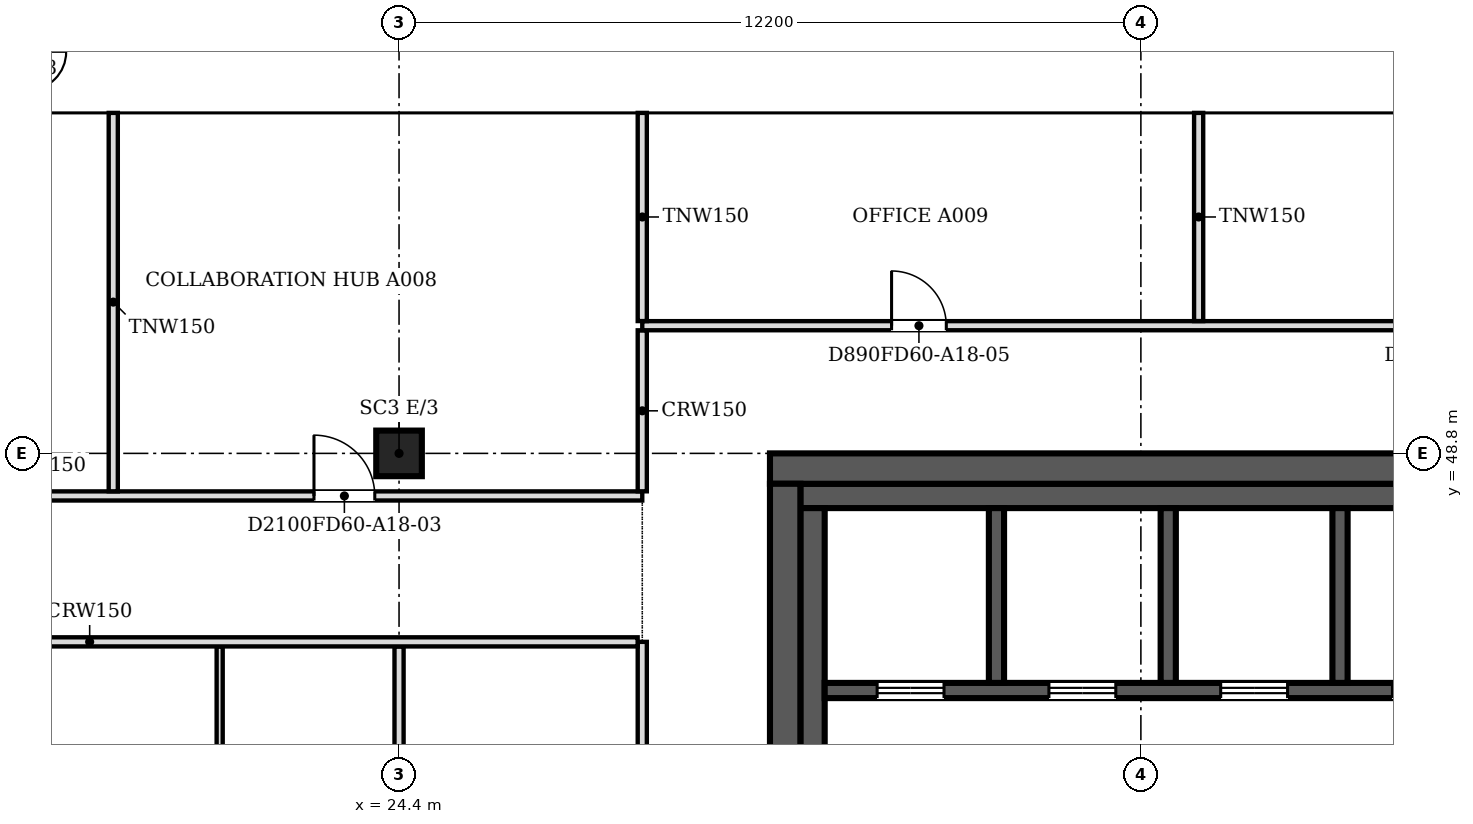
"""IFC4 building model, lengths in metres.
Left out: names, types, materials, properties, quantities, classifications, styles, units other than length and angle.
Written with IfcOpenShell. Run it as: python <this file> out.ifc"""

import sys

from ifc_helpers import new_model, si_unit, direction, frame, frame_2d, origin, origin_2d, place, context, subcontext, project, spatial, polyline, rectangle, outline, extrude, faceted_brep, source, transform, mapped, element, fill, save


model = new_model("IFC4")
c1 = context("Model", 3, precision=1e-05, world=origin(), true_north=direction((0.0, 1.0)))
c2 = subcontext(c1, "Body", "Model", "MODEL_VIEW")
j1 = project(units=[si_unit("LENGTHUNIT", "METRE"), si_unit("PLANEANGLEUNIT", "RADIAN")], contexts=[c1])
p1 = place(None, origin())
s1 = spatial("IfcSite", under=j1, at=p1, CompositionType="ELEMENT")
p2 = place(p1, origin())
s2 = spatial("IfcBuilding", under=s1, at=p2, CompositionType="ELEMENT")
p3 = place(p2, frame((0.0, 0.0, 197.9)))
s3 = spatial("IfcBuildingStorey", under=s2, at=p3, CompositionType="ELEMENT", Elevation=197.9)
p4 = place(p3, frame((24.4, 48.8, 0.0), z_axis=(0.0, 0.0, 1.0), x_axis=(1.0, 0.0, 0.0)))
e1 = element("IfcColumn", 1, at=p4, inside=s3, PredefinedType="COLUMN", context=c2, shape_type="SweptSolid", body=[
    extrude(rectangle(XDim=0.75, YDim=0.75, at=origin_2d()), origin(), (0.0, 0.0, 1.0), 3.6),
])
m1 = source(origin(), c2, "Body", "SweptSolid", [
    extrude(outline(polyline([(6.1, 0.0), (3.05, 3.8), (0.0, 0.0), (6.1, 0.0)])), frame((0.0, 0.25, 0.0), z_axis=(0.0, -1.0, 0.0), x_axis=(1.0, 0.0, 0.0)), (0.0, 0.0, 1.0), 0.5),
])
p5 = place(p3, frame((45.75, 54.65, 0.0), z_axis=(0.0, 0.0, 1.0), x_axis=(-1.0, 0.0, 0.0)))
e2 = element("IfcWall", 2, at=p5, inside=s3, PredefinedType="SOLIDWALL", context=c2, shape_type="MappedRepresentation", body=[
    mapped(m1, transform((0.0, 0.0, 0.0), scale=1.0)),
])
m2 = source(origin(), c2, "Body", "SweptSolid", [
    extrude(outline(polyline([(5.579, 0.25), (3.05, 3.401), (0.521, 0.25), (5.579, 0.25)])), frame((0.0, 0.26, 0.0), z_axis=(0.0, -1.0, 0.0), x_axis=(1.0, 0.0, 0.0)), (0.0, 0.0, 1.0), 0.52),
])
p6 = place(p5, origin())
e3 = element("IfcOpeningElement", 3, at=p6, cuts=e2, PredefinedType="OPENING", context=c2, shape_type="MappedRepresentation", body=[
    mapped(m2, transform((0.0, 0.0, 0.0), scale=1.0)),
])
m3 = source(origin(), c2, "Body", "Brep", [
    faceted_brep([(6.1, -0.25, 0.0), (3.05, -0.25, 3.8), (0.0, -0.25, 0.0), (6.1, -0.25, 0.0), (0.0, 0.25, 0.0), (3.05, 0.25, 3.8), (6.1, 0.25, 0.0), (6.1, 0.25, 0.0)], [[[0, 1, 2, 3]], [[4, 5, 6, 7]], [[6, 5, 1, 0]], [[5, 4, 2, 1]], [[4, 7, 3, 2]], [[3, 7, 6, 0]]]),
])
p7 = place(p3, frame((39.65, 54.65, 0.0), z_axis=(0.0, 0.0, 1.0), x_axis=(-1.0, 0.0, 0.0)))
e4 = element("IfcWall", 4, at=p7, inside=s3, PredefinedType="SOLIDWALL", context=c2, shape_type="MappedRepresentation", body=[
    mapped(m3, transform((0.0, 0.0, 0.0), scale=1.0)),
])
p8 = place(p7, origin())
e5 = element("IfcOpeningElement", 5, at=p8, cuts=e4, PredefinedType="OPENING", context=c2, shape_type="MappedRepresentation", body=[
    mapped(m2, transform((0.0, 0.0, 0.0), scale=1.0)),
])
p9 = place(p3, frame((33.55, 54.65, 0.0), z_axis=(0.0, 0.0, 1.0), x_axis=(-1.0, 0.0, 0.0)))
e6 = element("IfcWall", 6, at=p9, inside=s3, PredefinedType="SOLIDWALL", context=c2, shape_type="MappedRepresentation", body=[
    mapped(m1, transform((0.0, 0.0, 0.0), scale=1.0)),
])
p10 = place(p9, origin())
e7 = element("IfcOpeningElement", 7, at=p10, cuts=e6, PredefinedType="OPENING", context=c2, shape_type="MappedRepresentation", body=[
    mapped(m2, transform((0.0, 0.0, 0.0), scale=1.0)),
])
p11 = place(p3, frame((27.45, 54.65, 0.0), z_axis=(0.0, 0.0, 1.0), x_axis=(-1.0, 0.0, 0.0)))
e8 = element("IfcWall", 8, at=p11, inside=s3, PredefinedType="SOLIDWALL", context=c2, shape_type="MappedRepresentation", body=[
    mapped(m3, transform((0.0, 0.0, 0.0), scale=1.0)),
])
p12 = place(p11, origin())
e9 = element("IfcOpeningElement", 9, at=p12, cuts=e8, PredefinedType="OPENING", context=c2, shape_type="MappedRepresentation", body=[
    mapped(m2, transform((0.0, 0.0, 0.0), scale=1.0)),
])
p13 = place(p3, frame((21.35, 54.65, 0.0), z_axis=(0.0, 0.0, 1.0), x_axis=(-1.0, 0.0, 0.0)))
e10 = element("IfcWall", 10, at=p13, inside=s3, PredefinedType="SOLIDWALL", context=c2, shape_type="MappedRepresentation", body=[
    mapped(m1, transform((0.0, 0.0, 0.0), scale=1.0)),
])
p14 = place(p13, origin())
e11 = element("IfcOpeningElement", 11, at=p14, cuts=e10, PredefinedType="OPENING", context=c2, shape_type="MappedRepresentation", body=[
    mapped(m2, transform((0.0, 0.0, 0.0), scale=1.0)),
])
p15 = place(p2, frame((0.0, 0.0, 201.7)))
s4 = spatial("IfcBuildingStorey", under=s2, at=p15, CompositionType="ELEMENT", Elevation=201.7)
m4 = source(origin(), c2, "Body", "Brep", [
    faceted_brep([(3.05, -0.25, 0.0), (6.1, -0.25, 3.8), (6.1, -0.25, 3.8), (3.05, -0.25, 7.6), (0.0, -0.25, 3.8), (0.0, 0.25, 3.8), (3.05, 0.25, 7.6), (6.1, 0.25, 3.8), (6.1, 0.25, 3.8), (3.05, 0.25, 0.0)], [[[0, 1, 2, 3, 4]], [[5, 6, 7, 8, 9]], [[9, 8, 1, 0]], [[7, 6, 3, 2]], [[6, 5, 4, 3]], [[5, 9, 0, 4]], [[1, 8, 7, 2]]]),
])
p16 = place(p15, frame((42.7, 54.65, -3.8), z_axis=(0.0, 0.0, 1.0), x_axis=(-1.0, 0.0, 0.0)))
e12 = element("IfcWall", 12, at=p16, inside=s4, PredefinedType="SOLIDWALL", context=c2, shape_type="MappedRepresentation", body=[
    mapped(m4, transform((0.0, 0.0, 0.0), scale=1.0)),
])
m5 = source(origin(), c2, "Body", "SweptSolid", [
    extrude(outline(polyline([(3.05, 0.399), (5.78, 3.8), (3.05, 7.201), (0.321, 3.8), (3.05, 0.399)])), frame((0.0, 0.26, 0.0), z_axis=(0.0, -1.0, 0.0), x_axis=(1.0, 0.0, 0.0)), (0.0, 0.0, 1.0), 0.52),
])
p17 = place(p16, origin())
e13 = element("IfcOpeningElement", 13, at=p17, cuts=e12, PredefinedType="OPENING", context=c2, shape_type="MappedRepresentation", body=[
    mapped(m5, transform((0.0, 0.0, 0.0), scale=1.0)),
])
m6 = source(origin(), c2, "Body", "SweptSolid", [
    extrude(outline(polyline([(3.05, 0.0), (6.1, 3.8), (3.05, 7.6), (0.0, 3.8), (3.05, 0.0)])), frame((0.0, 0.25, 0.0), z_axis=(0.0, -1.0, 0.0), x_axis=(1.0, 0.0, 0.0)), (0.0, 0.0, 1.0), 0.5),
])
p18 = place(p15, frame((36.6, 54.65, -3.8), z_axis=(0.0, 0.0, 1.0), x_axis=(-1.0, 0.0, 0.0)))
e14 = element("IfcWall", 14, at=p18, inside=s4, PredefinedType="SOLIDWALL", context=c2, shape_type="MappedRepresentation", body=[
    mapped(m6, transform((0.0, 0.0, 0.0), scale=1.0)),
])
p19 = place(p18, origin())
e15 = element("IfcOpeningElement", 15, at=p19, cuts=e14, PredefinedType="OPENING", context=c2, shape_type="MappedRepresentation", body=[
    mapped(m5, transform((0.0, 0.0, 0.0), scale=1.0)),
])
p20 = place(p15, frame((30.5, 54.65, -3.8), z_axis=(0.0, 0.0, 1.0), x_axis=(-1.0, 0.0, 0.0)))
e16 = element("IfcWall", 16, at=p20, inside=s4, PredefinedType="SOLIDWALL", context=c2, shape_type="MappedRepresentation", body=[
    mapped(m6, transform((0.0, 0.0, 0.0), scale=1.0)),
])
p21 = place(p20, origin())
e17 = element("IfcOpeningElement", 17, at=p21, cuts=e16, PredefinedType="OPENING", context=c2, shape_type="MappedRepresentation", body=[
    mapped(m5, transform((0.0, 0.0, 0.0), scale=1.0)),
])
p22 = place(p15, frame((24.4, 54.65, -3.8), z_axis=(0.0, 0.0, 1.0), x_axis=(-1.0, 0.0, 0.0)))
e18 = element("IfcWall", 18, at=p22, inside=s4, PredefinedType="SOLIDWALL", context=c2, shape_type="MappedRepresentation", body=[
    mapped(m4, transform((0.0, 0.0, 0.0), scale=1.0)),
])
p23 = place(p22, origin())
e19 = element("IfcOpeningElement", 19, at=p23, cuts=e18, PredefinedType="OPENING", context=c2, shape_type="MappedRepresentation", body=[
    mapped(m5, transform((0.0, 0.0, 0.0), scale=1.0)),
])
p24 = place(p3, frame((30.75, 24.9, 0.0), z_axis=(0.0, 0.0, 1.0), x_axis=(0.0, 1.0, 0.0)))
e20 = element("IfcWall", 20, at=p24, inside=s3, PredefinedType="SHEAR", context=c2, shape_type="SweptSolid", body=[
    extrude(rectangle(XDim=23.4, YDim=0.5, at=frame_2d((11.7, 0.0))), origin(), (0.0, 0.0, 1.0), 3.8),
])
m7 = source(origin(), c2, "Body", "SweptSolid", [
    extrude(rectangle(XDim=2.1, YDim=2.4, at=frame_2d((1.05, 1.2))), frame((0.0, 0.26, 0.0), z_axis=(0.0, -1.0, 0.0), x_axis=(1.0, 0.0, 0.0)), (0.0, 0.0, 1.0), 0.52),
])
p25 = place(p24, frame((4.9, 0.0, 0.0)))
e21 = element("IfcOpeningElement", 21, at=p25, cuts=e20, PredefinedType="OPENING", context=c2, shape_type="MappedRepresentation", body=[
    mapped(m7, transform((0.0, 0.0, 0.0), scale=1.0)),
])
p26 = place(p24, frame((16.4, 0.0, 0.0)))
e22 = element("IfcOpeningElement", 22, at=p26, cuts=e20, PredefinedType="OPENING", context=c2, shape_type="MappedRepresentation", body=[
    mapped(m7, transform((0.0, 0.0, 0.0), scale=1.0)),
])
p27 = place(p3, frame((30.5, 48.55, 0.0), z_axis=(0.0, 0.0, 1.0), x_axis=(1.0, 0.0, 0.0)))
e23 = element("IfcWall", 23, at=p27, inside=s3, PredefinedType="SHEAR", context=c2, shape_type="SweptSolid", body=[
    extrude(rectangle(XDim=24.4, YDim=0.5, at=frame_2d((12.2, 0.0))), origin(), (0.0, 0.0, 1.0), 3.8),
])
p28 = place(p3, frame((31.0, 48.1, 0.0), z_axis=(0.0, 0.0, 1.0), x_axis=(1.0, 0.0, 0.0)))
e24 = element("IfcWall", 24, at=p28, inside=s3, PredefinedType="SOLIDWALL", context=c2, shape_type="SweptSolid", body=[
    extrude(rectangle(XDim=23.4, YDim=0.4, at=frame_2d((11.7, 0.0))), origin(), (0.0, 0.0, 1.0), 3.8),
])
p29 = place(p3, frame((31.2, 43.4, 0.0), z_axis=(0.0, 0.0, 1.0), x_axis=(0.0, 1.0, 0.0)))
e25 = element("IfcWall", 25, at=p29, inside=s3, PredefinedType="SOLIDWALL", context=c2, shape_type="SweptSolid", body=[
    extrude(rectangle(XDim=4.5, YDim=0.4, at=frame_2d((2.25, 0.0))), origin(), (0.0, 0.0, 1.0), 3.8),
])
p30 = place(p3, frame((42.45, 44.9, 0.0), z_axis=(0.0, 0.0, 1.0), x_axis=(-1.0, 0.0, 0.0)))
e26 = element("IfcWall", 26, at=p30, inside=s3, PredefinedType="SOLIDWALL", context=c2, shape_type="SweptSolid", body=[
    extrude(rectangle(XDim=11.05, YDim=0.25, at=frame_2d((5.525, 0.0))), origin(), (0.0, 0.0, 1.0), 3.8),
])
m8 = source(origin(), c2, "Body", "SweptSolid", [
    extrude(rectangle(XDim=1.1, YDim=2.1, at=frame_2d((0.55, 1.05))), frame((0.0, 0.135, 0.0), z_axis=(0.0, -1.0, 0.0), x_axis=(1.0, 0.0, 0.0)), (0.0, 0.0, 1.0), 0.27),
])
p31 = place(p30, frame((9.087, 0.0, 0.0)))
e27 = element("IfcOpeningElement", 27, at=p31, cuts=e26, PredefinedType="OPENING", context=c2, shape_type="MappedRepresentation", body=[
    mapped(m8, transform((0.0, 0.0, 0.0), scale=1.0)),
])
p32 = place(p30, frame((6.262, 0.0, 0.0)))
e28 = element("IfcOpeningElement", 28, at=p32, cuts=e26, PredefinedType="OPENING", context=c2, shape_type="MappedRepresentation", body=[
    mapped(m8, transform((0.0, 0.0, 0.0), scale=1.0)),
])
p33 = place(p30, frame((3.438, 0.0, 0.0)))
e29 = element("IfcOpeningElement", 29, at=p33, cuts=e26, PredefinedType="OPENING", context=c2, shape_type="MappedRepresentation", body=[
    mapped(m8, transform((0.0, 0.0, 0.0), scale=1.0)),
])
p34 = place(p30, frame((0.613, 0.0, 0.0)))
e30 = element("IfcOpeningElement", 30, at=p34, cuts=e26, PredefinedType="OPENING", context=c2, shape_type="MappedRepresentation", body=[
    mapped(m8, transform((0.0, 0.0, 0.0), scale=1.0)),
])
for number, where, z_axis, x_axis in (
    (31, (34.225, 45.025, 0.0), (0.0, 0.0, 1.0), (0.0, 1.0, 0.0)),
    (32, (37.05, 45.025, 0.0), (0.0, 0.0, 1.0), (0.0, 1.0, 0.0)),
    (33, (39.875, 45.025, 0.0), (0.0, 0.0, 1.0), (0.0, 1.0, 0.0)),
):
    element("IfcWall", number, at=place(p3, frame(where, z_axis=z_axis, x_axis=x_axis)), inside=s3, PredefinedType="SOLIDWALL", context=c2, shape_type="SweptSolid", body=[
        extrude(rectangle(XDim=2.875, YDim=0.25, at=frame_2d((1.438, 0.0))), origin(), (0.0, 0.0, 1.0), 3.8),
    ])
p35 = place(p3, frame((28.4, 18.8, 0.0), z_axis=(0.0, 0.0, 1.0), x_axis=(0.0, 1.0, 0.0)))
e34 = element("IfcWall", 34, at=p35, inside=s3, PredefinedType="PARTITIONING", context=c2, shape_type="SweptSolid", body=[
    extrude(rectangle(XDim=26.9, YDim=0.15, at=frame_2d((13.45, 0.0))), origin(), (0.0, 0.0, 1.0), 3.067),
])
m9 = source(origin(), c2, "Body", "SweptSolid", [
    extrude(rectangle(XDim=0.9, YDim=2.1, at=frame_2d((0.45, 1.05))), frame((0.0, 0.085, 0.0), z_axis=(0.0, -1.0, 0.0), x_axis=(1.0, 0.0, 0.0)), (0.0, 0.0, 1.0), 0.17),
])
p36 = place(p35, frame((1.3, 0.0, 0.0)))
e35 = element("IfcOpeningElement", 35, at=p36, cuts=e34, PredefinedType="OPENING", context=c2, shape_type="MappedRepresentation", body=[
    mapped(m9, transform((0.0, 0.0, 0.0), scale=1.0)),
])
m10 = source(origin(), c2, "Body", "SweptSolid", [
    extrude(rectangle(XDim=1.0, YDim=2.1, at=frame_2d((0.5, 1.05))), frame((0.0, 0.085, 0.0), z_axis=(0.0, -1.0, 0.0), x_axis=(1.0, 0.0, 0.0)), (0.0, 0.0, 1.0), 0.17),
])
p37 = place(p35, frame((9.7, 0.0, 0.0)))
e36 = element("IfcOpeningElement", 36, at=p37, cuts=e34, PredefinedType="OPENING", context=c2, shape_type="MappedRepresentation", body=[
    mapped(m10, transform((0.0, 0.0, 0.0), scale=1.0)),
])
p38 = place(p35, frame((20.35, 0.0, 0.0)))
e37 = element("IfcOpeningElement", 37, at=p38, cuts=e34, PredefinedType="OPENING", context=c2, shape_type="MappedRepresentation", body=[
    mapped(m10, transform((0.0, 0.0, 0.0), scale=1.0)),
])
p39 = place(p3, frame((21.45, 33.626, 0.0), z_axis=(0.0, 0.0, 1.0), x_axis=(0.0, 1.0, 0.0)))
e38 = element("IfcWall", 38, at=p39, inside=s3, PredefinedType="PARTITIONING", context=c2, shape_type="SweptSolid", body=[
    extrude(rectangle(XDim=11.998, YDim=0.1, at=frame_2d((5.999, 0.0))), origin(), (0.0, 0.0, 1.0), 3.067),
])
m11 = source(origin(), c2, "Body", "SweptSolid", [
    extrude(rectangle(XDim=0.9, YDim=2.1, at=frame_2d((0.45, 1.05))), frame((0.0, 0.06, 0.0), z_axis=(0.0, -1.0, 0.0), x_axis=(1.0, 0.0, 0.0)), (0.0, 0.0, 1.0), 0.12),
])
p40 = place(p39, frame((5.5, 0.0, 0.0)))
e39 = element("IfcOpeningElement", 39, at=p40, cuts=e38, PredefinedType="OPENING", context=c2, shape_type="MappedRepresentation", body=[
    mapped(m11, transform((0.0, 0.0, 0.0), scale=1.0)),
])
p41 = place(p3, frame((24.4, 36.976, 0.0), z_axis=(0.0, 0.0, 1.0), x_axis=(0.0, 1.0, 0.0)))
e40 = element("IfcWall", 40, at=p41, inside=s3, PredefinedType="PARTITIONING", context=c2, shape_type="SweptSolid", body=[
    extrude(rectangle(XDim=8.648, YDim=0.15, at=frame_2d((4.324, 0.0))), origin(), (0.0, 0.0, 1.0), 3.067),
])
p42 = place(p3, frame((28.324, 45.7, 0.0), z_axis=(0.0, 0.0, 1.0), x_axis=(-1.0, 0.0, 0.0)))
e41 = element("IfcWall", 41, at=p42, inside=s3, PredefinedType="PARTITIONING", context=c2, shape_type="SweptSolid", body=[
    extrude(rectangle(XDim=20.824, YDim=0.15, at=frame_2d((10.412, 0.0))), origin(), (0.0, 0.0, 1.0), 3.067),
])
p43 = place(p42, frame((18.024, 0.0, 0.0)))
e42 = element("IfcOpeningElement", 42, at=p43, cuts=e41, PredefinedType="OPENING", context=c2, shape_type="MappedRepresentation", body=[
    mapped(m10, transform((0.0, 0.0, 0.0), scale=1.0)),
])
p44 = place(p3, frame((7.5, 48.1, 0.0), z_axis=(0.0, 0.0, 1.0), x_axis=(1.0, 0.0, 0.0)))
e43 = element("IfcWall", 43, at=p44, inside=s3, PredefinedType="PARTITIONING", context=c2, shape_type="SweptSolid", body=[
    extrude(rectangle(XDim=20.9, YDim=0.15, at=frame_2d((10.45, 0.0))), origin(), (0.0, 0.0, 1.0), 3.067),
])
p45 = place(p44, frame((15.501, 0.0, 0.0)))
e44 = element("IfcOpeningElement", 44, at=p45, cuts=e43, PredefinedType="OPENING", context=c2, shape_type="MappedRepresentation", body=[
    mapped(m10, transform((0.0, 0.0, 0.0), scale=1.0)),
])
p46 = place(p44, frame((5.6, 0.0, 0.0)))
e45 = element("IfcOpeningElement", 45, at=p46, cuts=e43, PredefinedType="OPENING", context=c2, shape_type="MappedRepresentation", body=[
    mapped(m10, transform((0.0, 0.0, 0.0), scale=1.0)),
])
p47 = place(p3, frame((19.7, 48.176, 0.0), z_axis=(0.0, 0.0, 1.0), x_axis=(0.0, 1.0, 0.0)))
e46 = element("IfcWall", 46, at=p47, inside=s3, PredefinedType="PARTITIONING", context=c2, shape_type="SweptSolid", body=[
    extrude(rectangle(XDim=6.224, YDim=0.15, at=frame_2d((3.112, 0.0))), origin(), (0.0, 0.0, 1.0), 3.067),
])
p48 = place(p3, frame((28.4, 48.176, 0.0), z_axis=(0.0, 0.0, 1.0), x_axis=(0.0, 1.0, 0.0)))
e47 = element("IfcWall", 47, at=p48, inside=s3, PredefinedType="PARTITIONING", context=c2, shape_type="SweptSolid", body=[
    extrude(rectangle(XDim=2.648, YDim=0.15, at=frame_2d((1.324, 0.0))), origin(), (0.0, 0.0, 1.0), 3.067),
])
p49 = place(p3, frame((28.4, 50.9, 0.0), z_axis=(0.0, 0.0, 1.0), x_axis=(1.0, 0.0, 0.0)))
e48 = element("IfcWall", 48, at=p49, inside=s3, PredefinedType="PARTITIONING", context=c2, shape_type="SweptSolid", body=[
    extrude(rectangle(XDim=31.254, YDim=0.15, at=frame_2d((15.627, 0.0))), origin(), (0.0, 0.0, 1.0), 3.067),
])
p50 = place(p49, frame((4.1, 0.0, 0.0)))
e49 = element("IfcOpeningElement", 49, at=p50, cuts=e48, PredefinedType="OPENING", context=c2, shape_type="MappedRepresentation", body=[
    mapped(m9, transform((0.0, 0.0, 0.0), scale=1.0)),
])
p51 = place(p49, frame((13.25, 0.0, 0.0)))
e50 = element("IfcOpeningElement", 50, at=p51, cuts=e48, PredefinedType="OPENING", context=c2, shape_type="MappedRepresentation", body=[
    mapped(m9, transform((0.0, 0.0, 0.0), scale=1.0)),
])
p52 = place(p49, frame((24.3, 0.0, 0.0)))
e51 = element("IfcOpeningElement", 51, at=p52, cuts=e48, PredefinedType="OPENING", context=c2, shape_type="MappedRepresentation", body=[
    mapped(m9, transform((0.0, 0.0, 0.0), scale=1.0)),
])
for number, where, z_axis, x_axis in (
    (52, (28.4, 50.976, 0.0), (0.0, 0.0, 1.0), (0.0, 1.0, 0.0)),
    (53, (37.55, 50.976, 0.0), (0.0, 0.0, 1.0), (0.0, 1.0, 0.0)),
):
    element("IfcWall", number, at=place(p3, frame(where, z_axis=z_axis, x_axis=x_axis)), inside=s3, PredefinedType="PARTITIONING", context=c2, shape_type="SweptSolid", body=[
        extrude(rectangle(XDim=3.424, YDim=0.15, at=frame_2d((1.712, 0.0))), origin(), (0.0, 0.0, 1.0), 3.067),
    ])
m12 = source(origin(), c2, "Body", "SweptSolid", [
    extrude(rectangle(XDim=1.1, YDim=2.1, at=frame_2d((0.55, 1.05))), frame((0.0, 0.025, 0.0), z_axis=(0.0, -1.0, 0.0), x_axis=(1.0, 0.0, 0.0)), (0.0, 0.0, 1.0), 0.05),
])
p53 = place(p31, origin())
e54 = element("IfcDoor", 54, at=p53, inside=s3, OperationType="DOUBLE_DOOR_SLIDING", PredefinedType="DOOR", context=c2, shape_type="MappedRepresentation", body=[
    mapped(m12, transform((0.0, 0.0, 0.0), scale=1.0)),
])
fill(e27, e54)
p54 = place(p32, origin())
e55 = element("IfcDoor", 55, at=p54, inside=s3, OperationType="DOUBLE_DOOR_SLIDING", PredefinedType="DOOR", context=c2, shape_type="MappedRepresentation", body=[
    mapped(m12, transform((0.0, 0.0, 0.0), scale=1.0)),
])
fill(e28, e55)
p55 = place(p33, origin())
e56 = element("IfcDoor", 56, at=p55, inside=s3, OperationType="DOUBLE_DOOR_SLIDING", PredefinedType="DOOR", context=c2, shape_type="MappedRepresentation", body=[
    mapped(m12, transform((0.0, 0.0, 0.0), scale=1.0)),
])
fill(e29, e56)
p56 = place(p34, origin())
e57 = element("IfcDoor", 57, at=p56, inside=s3, OperationType="DOUBLE_DOOR_SLIDING", PredefinedType="DOOR", context=c2, shape_type="MappedRepresentation", body=[
    mapped(m12, transform((0.0, 0.0, 0.0), scale=1.0)),
])
fill(e30, e57)
m13 = source(origin(), c2, "Body", "SweptSolid", [
    extrude(rectangle(XDim=1.0, YDim=2.1, at=frame_2d((0.5, 1.05))), frame((0.0, 0.025, 0.0), z_axis=(0.0, -1.0, 0.0), x_axis=(1.0, 0.0, 0.0)), (0.0, 0.0, 1.0), 0.05),
])
p57 = place(p45, origin())
e58 = element("IfcDoor", 58, at=p57, inside=s3, OperationType="SINGLE_SWING_LEFT", PredefinedType="DOOR", context=c2, shape_type="MappedRepresentation", body=[
    mapped(m13, transform((0.0, 0.0, 0.0), scale=1.0)),
])
fill(e44, e58)
m14 = source(origin(), c2, "Body", "SweptSolid", [
    extrude(rectangle(XDim=0.9, YDim=2.1, at=frame_2d((0.45, 1.05))), frame((0.0, 0.025, 0.0), z_axis=(0.0, -1.0, 0.0), x_axis=(1.0, 0.0, 0.0)), (0.0, 0.0, 1.0), 0.05),
])
p58 = place(p50, origin())
e59 = element("IfcDoor", 59, at=p58, inside=s3, OperationType="SINGLE_SWING_LEFT", PredefinedType="DOOR", context=c2, shape_type="MappedRepresentation", body=[
    mapped(m14, transform((0.0, 0.0, 0.0), scale=1.0)),
])
fill(e49, e59)
save(model, sys.argv[1])
